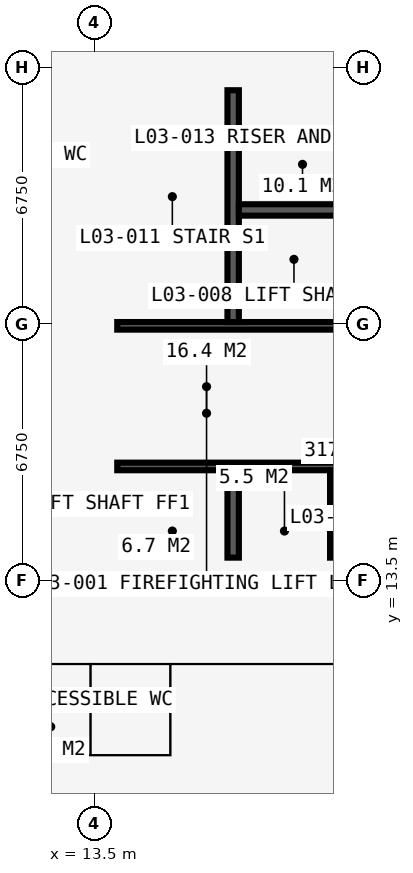
"""IFC4 building model, lengths in metres.
Left out: names, types, materials, properties, quantities, classifications, styles, units other than length and angle.
Written with IfcOpenShell. Run it as: python <this file> out.ifc"""

import sys

from ifc_helpers import new_model, si_unit, direction, frame, frame_2d, origin, place, context, subcontext, project, spatial, rectangle, extrude, element, fill, save


model = new_model("IFC4")
c1 = context("Model", 3, precision=1e-05, world=origin(), true_north=direction((0.0, 1.0)))
c2 = subcontext(c1, "Body", "Model", "MODEL_VIEW")
j1 = project(units=[si_unit("LENGTHUNIT", "METRE"), si_unit("PLANEANGLEUNIT", "RADIAN")], contexts=[c1])
p1 = place(None, origin())
s1 = spatial("IfcSite", under=j1, at=p1, CompositionType="ELEMENT")
p2 = place(p1, origin())
s2 = spatial("IfcBuilding", under=s1, at=p2, CompositionType="ELEMENT")
p3 = place(p2, frame((0.0, 0.0, 13.5)))
s3 = spatial("IfcBuildingStorey", under=s2, at=p3, CompositionType="ELEMENT", Elevation=13.5)
p4 = place(p3, frame((12.9, 13.5, 0.0), z_axis=(0.0, 0.0, 1.0), x_axis=(1.0, 0.0, 0.0)))
e1 = element("IfcWall", 1, at=p4, inside=s3, PredefinedType="SHEAR", context=c2, shape_type="SweptSolid", body=[
    extrude(rectangle(XDim=14.7, YDim=1.2, at=frame_2d((7.35, 0.0))), origin(), (0.0, 0.0, 1.0), 4.5),
])
p5 = place(p3, frame((27.6, 27.0, 0.0), z_axis=(0.0, 0.0, 1.0), x_axis=(-1.0, 0.0, 0.0)))
e2 = element("IfcWall", 2, at=p5, inside=s3, PredefinedType="SHEAR", context=c2, shape_type="SweptSolid", body=[
    extrude(rectangle(XDim=14.7, YDim=1.2, at=frame_2d((7.35, 0.0))), origin(), (0.0, 0.0, 1.0), 4.5),
])
p6 = place(p5, frame((4.55, 0.0, 0.0)))
e3 = element("IfcOpeningElement", 3, at=p6, cuts=e2, PredefinedType="OPENING", context=c2, shape_type="SweptSolid", body=[
    extrude(rectangle(XDim=0.9, YDim=2.2, at=frame_2d((0.45, 1.1))), frame((0.0, 0.61, 0.0), z_axis=(0.0, -1.0, 0.0), x_axis=(1.0, 0.0, 0.0)), (0.0, 0.0, 1.0), 1.22),
])
p7 = place(p5, frame((7.525, 0.0, 0.0)))
e4 = element("IfcOpeningElement", 4, at=p7, cuts=e2, PredefinedType="OPENING", context=c2, shape_type="SweptSolid", body=[
    extrude(rectangle(XDim=1.0, YDim=2.2, at=frame_2d((0.5, 1.1))), frame((0.0, 0.61, 0.0), z_axis=(0.0, -1.0, 0.0), x_axis=(1.0, 0.0, 0.0)), (0.0, 0.0, 1.0), 1.22),
])
p8 = place(p3, frame((13.5, 26.4, 0.0), z_axis=(0.0, 0.0, 1.0), x_axis=(0.0, -1.0, 0.0)))
e5 = element("IfcWall", 5, at=p8, inside=s3, PredefinedType="SHEAR", context=c2, shape_type="SweptSolid", body=[
    extrude(rectangle(XDim=12.3, YDim=1.2, at=frame_2d((6.15, 0.0))), origin(), (0.0, 0.0, 1.0), 4.5),
])
p9 = place(p8, frame((7.45, 0.0, 0.0)))
e6 = element("IfcOpeningElement", 6, at=p9, cuts=e5, PredefinedType="OPENING", context=c2, shape_type="SweptSolid", body=[
    extrude(rectangle(XDim=1.2, YDim=2.2, at=frame_2d((0.6, 1.1))), frame((0.0, 0.61, 0.0), z_axis=(0.0, -1.0, 0.0), x_axis=(1.0, 0.0, 0.0)), (0.0, 0.0, 1.0), 1.22),
])
p10 = place(p3, frame((14.1, 16.5, 0.0), z_axis=(0.0, 0.0, 1.0), x_axis=(1.0, 0.0, 0.0)))
e7 = element("IfcWall", 7, at=p10, inside=s3, PredefinedType="SHEAR", context=c2, shape_type="SweptSolid", body=[
    extrude(rectangle(XDim=12.3, YDim=0.2, at=frame_2d((6.15, 0.0))), origin(), (0.0, 0.0, 1.0), 4.5),
])
p11 = place(p10, frame((0.9, 0.0, 0.0)))
e8 = element("IfcOpeningElement", 8, at=p11, cuts=e7, PredefinedType="OPENING", context=c2, shape_type="SweptSolid", body=[
    extrude(rectangle(XDim=1.1, YDim=2.2, at=frame_2d((0.55, 1.1))), frame((0.0, 0.11, 0.0), z_axis=(0.0, -1.0, 0.0), x_axis=(1.0, 0.0, 0.0)), (0.0, 0.0, 1.0), 0.22),
])
p12 = place(p10, frame((9.5, 0.0, 0.0)))
e9 = element("IfcOpeningElement", 9, at=p12, cuts=e7, PredefinedType="OPENING", context=c2, shape_type="SweptSolid", body=[
    extrude(rectangle(XDim=1.1, YDim=2.2, at=frame_2d((0.55, 1.1))), frame((0.0, 0.11, 0.0), z_axis=(0.0, -1.0, 0.0), x_axis=(1.0, 0.0, 0.0)), (0.0, 0.0, 1.0), 0.22),
])
p13 = place(p3, frame((14.1, 20.2, 0.0), z_axis=(0.0, 0.0, 1.0), x_axis=(1.0, 0.0, 0.0)))
e10 = element("IfcWall", 10, at=p13, inside=s3, PredefinedType="SHEAR", context=c2, shape_type="SweptSolid", body=[
    extrude(rectangle(XDim=12.3, YDim=0.2, at=frame_2d((6.15, 0.0))), origin(), (0.0, 0.0, 1.0), 4.5),
])
p14 = place(p13, frame((0.35, 0.0, 0.0)))
e11 = element("IfcOpeningElement", 11, at=p14, cuts=e10, PredefinedType="OPENING", context=c2, shape_type="SweptSolid", body=[
    extrude(rectangle(XDim=1.1, YDim=2.2, at=frame_2d((0.55, 1.1))), frame((0.0, 0.11, 0.0), z_axis=(0.0, -1.0, 0.0), x_axis=(1.0, 0.0, 0.0)), (0.0, 0.0, 1.0), 0.22),
])
p15 = place(p13, frame((9.75, 0.0, 0.0)))
e12 = element("IfcOpeningElement", 12, at=p15, cuts=e10, PredefinedType="OPENING", context=c2, shape_type="SweptSolid", body=[
    extrude(rectangle(XDim=1.1, YDim=2.2, at=frame_2d((0.55, 1.1))), frame((0.0, 0.11, 0.0), z_axis=(0.0, -1.0, 0.0), x_axis=(1.0, 0.0, 0.0)), (0.0, 0.0, 1.0), 0.22),
])
p16 = place(p3, frame((17.15, 20.3, 0.0), z_axis=(0.0, 0.0, 1.0), x_axis=(0.0, 1.0, 0.0)))
e13 = element("IfcWall", 13, at=p16, inside=s3, PredefinedType="SHEAR", context=c2, shape_type="SweptSolid", body=[
    extrude(rectangle(XDim=6.1, YDim=0.3, at=frame_2d((3.05, 0.0))), origin(), (0.0, 0.0, 1.0), 4.5),
])
p17 = place(p3, frame((17.3, 23.25, 0.0), z_axis=(0.0, 0.0, 1.0), x_axis=(1.0, 0.0, 0.0)))
e14 = element("IfcWall", 14, at=p17, inside=s3, PredefinedType="SHEAR", context=c2, shape_type="SweptSolid", body=[
    extrude(rectangle(XDim=5.9, YDim=0.3, at=frame_2d((2.95, 0.0))), origin(), (0.0, 0.0, 1.0), 4.5),
])
for number, where, z_axis, x_axis in (
    (15, (17.15, 14.1, 0.0), (0.0, 0.0, 1.0), (0.0, 1.0, 0.0)),
    (16, (19.85, 14.1, 0.0), (0.0, 0.0, 1.0), (0.0, 1.0, 0.0)),
):
    element("IfcWall", number, at=place(p3, frame(where, z_axis=z_axis, x_axis=x_axis)), inside=s3, PredefinedType="SHEAR", context=c2, shape_type="SweptSolid", body=[
        extrude(rectangle(XDim=2.3, YDim=0.3, at=frame_2d((1.15, 0.0))), origin(), (0.0, 0.0, 1.0), 4.5),
    ])
p18 = place(p3, frame((18.875, 16.6, 0.0), z_axis=(0.0, 0.0, 1.0), x_axis=(0.0, 1.0, 0.0)))
e17 = element("IfcWall", 17, at=p18, inside=s3, PredefinedType="PARTITIONING", context=c2, shape_type="SweptSolid", body=[
    extrude(rectangle(XDim=3.5, YDim=0.15, at=frame_2d((1.75, 0.0))), origin(), (0.0, 0.0, 1.0), 4.275),
])
p19 = place(p18, frame((1.15, 0.0, 0.0)))
e18 = element("IfcOpeningElement", 18, at=p19, cuts=e17, PredefinedType="OPENING", context=c2, shape_type="SweptSolid", body=[
    extrude(rectangle(XDim=1.2, YDim=2.2, at=frame_2d((0.6, 1.1))), frame((0.0, 0.085, 0.0), z_axis=(0.0, -1.0, 0.0), x_axis=(1.0, 0.0, 0.0)), (0.0, 0.0, 1.0), 0.17),
])
p20 = place(p3, frame((10.125, 11.3, 0.0), z_axis=(0.0, 0.0, 1.0), x_axis=(1.0, 0.0, 0.0)))
e19 = element("IfcWall", 19, at=p20, inside=s3, PredefinedType="PARTITIONING", context=c2, shape_type="SweptSolid", body=[
    extrude(rectangle(XDim=20.675, YDim=0.15, at=frame_2d((10.337, 0.0))), origin(), (0.0, 0.0, 1.0), 4.275),
])
p21 = place(p20, frame((1.725, 0.0, 0.0)))
e20 = element("IfcOpeningElement", 20, at=p21, cuts=e19, PredefinedType="OPENING", context=c2, shape_type="SweptSolid", body=[
    extrude(rectangle(XDim=1.0, YDim=2.2, at=frame_2d((0.5, 1.1))), frame((0.0, 0.085, 0.0), z_axis=(0.0, -1.0, 0.0), x_axis=(1.0, 0.0, 0.0)), (0.0, 0.0, 1.0), 0.17),
])
p22 = place(p20, frame((3.825, 0.0, 0.0)))
e21 = element("IfcOpeningElement", 21, at=p22, cuts=e19, PredefinedType="OPENING", context=c2, shape_type="SweptSolid", body=[
    extrude(rectangle(XDim=1.0, YDim=2.2, at=frame_2d((0.5, 1.1))), frame((0.0, 0.085, 0.0), z_axis=(0.0, -1.0, 0.0), x_axis=(1.0, 0.0, 0.0)), (0.0, 0.0, 1.0), 0.17),
])
p23 = place(p20, frame((10.625, 0.0, 0.0)))
e22 = element("IfcOpeningElement", 22, at=p23, cuts=e19, PredefinedType="OPENING", context=c2, shape_type="SweptSolid", body=[
    extrude(rectangle(XDim=1.6, YDim=2.4, at=frame_2d((0.8, 1.2))), frame((0.0, 0.085, 0.0), z_axis=(0.0, -1.0, 0.0), x_axis=(1.0, 0.0, 0.0)), (0.0, 0.0, 1.0), 0.17),
])
p24 = place(p3, frame((11.3, 8.9, 0.0), z_axis=(0.0, 0.0, 1.0), x_axis=(1.0, 0.0, 0.0)))
e23 = element("IfcWall", 23, at=p24, inside=s3, PredefinedType="PARTITIONING", context=c2, shape_type="SweptSolid", body=[
    extrude(rectangle(XDim=4.2, YDim=0.15, at=frame_2d((2.1, 0.0))), origin(), (0.0, 0.0, 1.0), 4.275),
])
p25 = place(p3, frame((13.4, 8.9, 0.0), z_axis=(0.0, 0.0, 1.0), x_axis=(0.0, 1.0, 0.0)))
e24 = element("IfcWall", 24, at=p25, inside=s3, PredefinedType="PARTITIONING", context=c2, shape_type="SweptSolid", body=[
    extrude(rectangle(XDim=2.4, YDim=0.1, at=frame_2d((1.2, 0.0))), origin(), (0.0, 0.0, 1.0), 3.777),
])
p26 = place(p3, frame((15.5, 8.9, 0.0), z_axis=(0.0, 0.0, 1.0), x_axis=(0.0, 1.0, 0.0)))
e25 = element("IfcWall", 25, at=p26, inside=s3, PredefinedType="PARTITIONING", context=c2, shape_type="SweptSolid", body=[
    extrude(rectangle(XDim=2.4, YDim=0.1, at=frame_2d((1.2, 0.0))), origin(), (0.0, 0.0, 1.0), 4.275),
])
p27 = place(p11, origin())
e26 = element("IfcDoor", 26, at=p27, inside=s3, OperationType="DOUBLE_DOOR_SLIDING", PredefinedType="DOOR", context=c2, shape_type="SweptSolid", body=[
    extrude(rectangle(XDim=1.1, YDim=2.2, at=frame_2d((0.55, 1.1))), frame((0.0, 0.025, 0.0), z_axis=(0.0, -1.0, 0.0), x_axis=(1.0, 0.0, 0.0)), (0.0, 0.0, 1.0), 0.05),
])
fill(e8, e26)
p28 = place(p9, origin())
e27 = element("IfcDoor", 27, at=p28, inside=s3, OperationType="DOUBLE_DOOR_SINGLE_SWING", PredefinedType="DOOR", context=c2, shape_type="SweptSolid", body=[
    extrude(rectangle(XDim=1.2, YDim=2.2, at=frame_2d((0.6, 1.1))), frame((0.0, 0.025, 0.0), z_axis=(0.0, -1.0, 0.0), x_axis=(1.0, 0.0, 0.0)), (0.0, 0.0, 1.0), 0.05),
])
fill(e6, e27)
p29 = place(p19, origin())
e28 = element("IfcDoor", 28, at=p29, inside=s3, OperationType="DOUBLE_DOOR_SINGLE_SWING", PredefinedType="DOOR", context=c2, shape_type="SweptSolid", body=[
    extrude(rectangle(XDim=1.2, YDim=2.2, at=frame_2d((0.6, 1.1))), frame((0.0, 0.025, 0.0), z_axis=(0.0, -1.0, 0.0), x_axis=(1.0, 0.0, 0.0)), (0.0, 0.0, 1.0), 0.05),
])
fill(e18, e28)
p30 = place(p7, origin())
e29 = element("IfcDoor", 29, at=p30, inside=s3, OperationType="SINGLE_SWING_LEFT", PredefinedType="DOOR", context=c2, shape_type="SweptSolid", body=[
    extrude(rectangle(XDim=1.0, YDim=2.2, at=frame_2d((0.5, 1.1))), frame((0.0, 0.025, 0.0), z_axis=(0.0, -1.0, 0.0), x_axis=(1.0, 0.0, 0.0)), (0.0, 0.0, 1.0), 0.05),
])
fill(e4, e29)
p31 = place(p14, origin())
e30 = element("IfcDoor", 30, at=p31, inside=s3, OperationType="SINGLE_SWING_LEFT", PredefinedType="DOOR", context=c2, shape_type="SweptSolid", body=[
    extrude(rectangle(XDim=1.1, YDim=2.2, at=frame_2d((0.55, 1.1))), frame((0.0, 0.025, 0.0), z_axis=(0.0, -1.0, 0.0), x_axis=(1.0, 0.0, 0.0)), (0.0, 0.0, 1.0), 0.05),
])
fill(e11, e30)
p32 = place(p21, origin())
e31 = element("IfcDoor", 31, at=p32, inside=s3, OperationType="SINGLE_SWING_LEFT", PredefinedType="DOOR", context=c2, shape_type="SweptSolid", body=[
    extrude(rectangle(XDim=1.0, YDim=2.2, at=frame_2d((0.5, 1.1))), frame((0.0, 0.025, 0.0), z_axis=(0.0, -1.0, 0.0), x_axis=(1.0, 0.0, 0.0)), (0.0, 0.0, 1.0), 0.05),
])
fill(e20, e31)
p33 = place(p22, origin())
e32 = element("IfcDoor", 32, at=p33, inside=s3, OperationType="SINGLE_SWING_LEFT", PredefinedType="DOOR", context=c2, shape_type="SweptSolid", body=[
    extrude(rectangle(XDim=1.0, YDim=2.2, at=frame_2d((0.5, 1.1))), frame((0.0, 0.025, 0.0), z_axis=(0.0, -1.0, 0.0), x_axis=(1.0, 0.0, 0.0)), (0.0, 0.0, 1.0), 0.05),
])
fill(e21, e32)
save(model, sys.argv[1])
